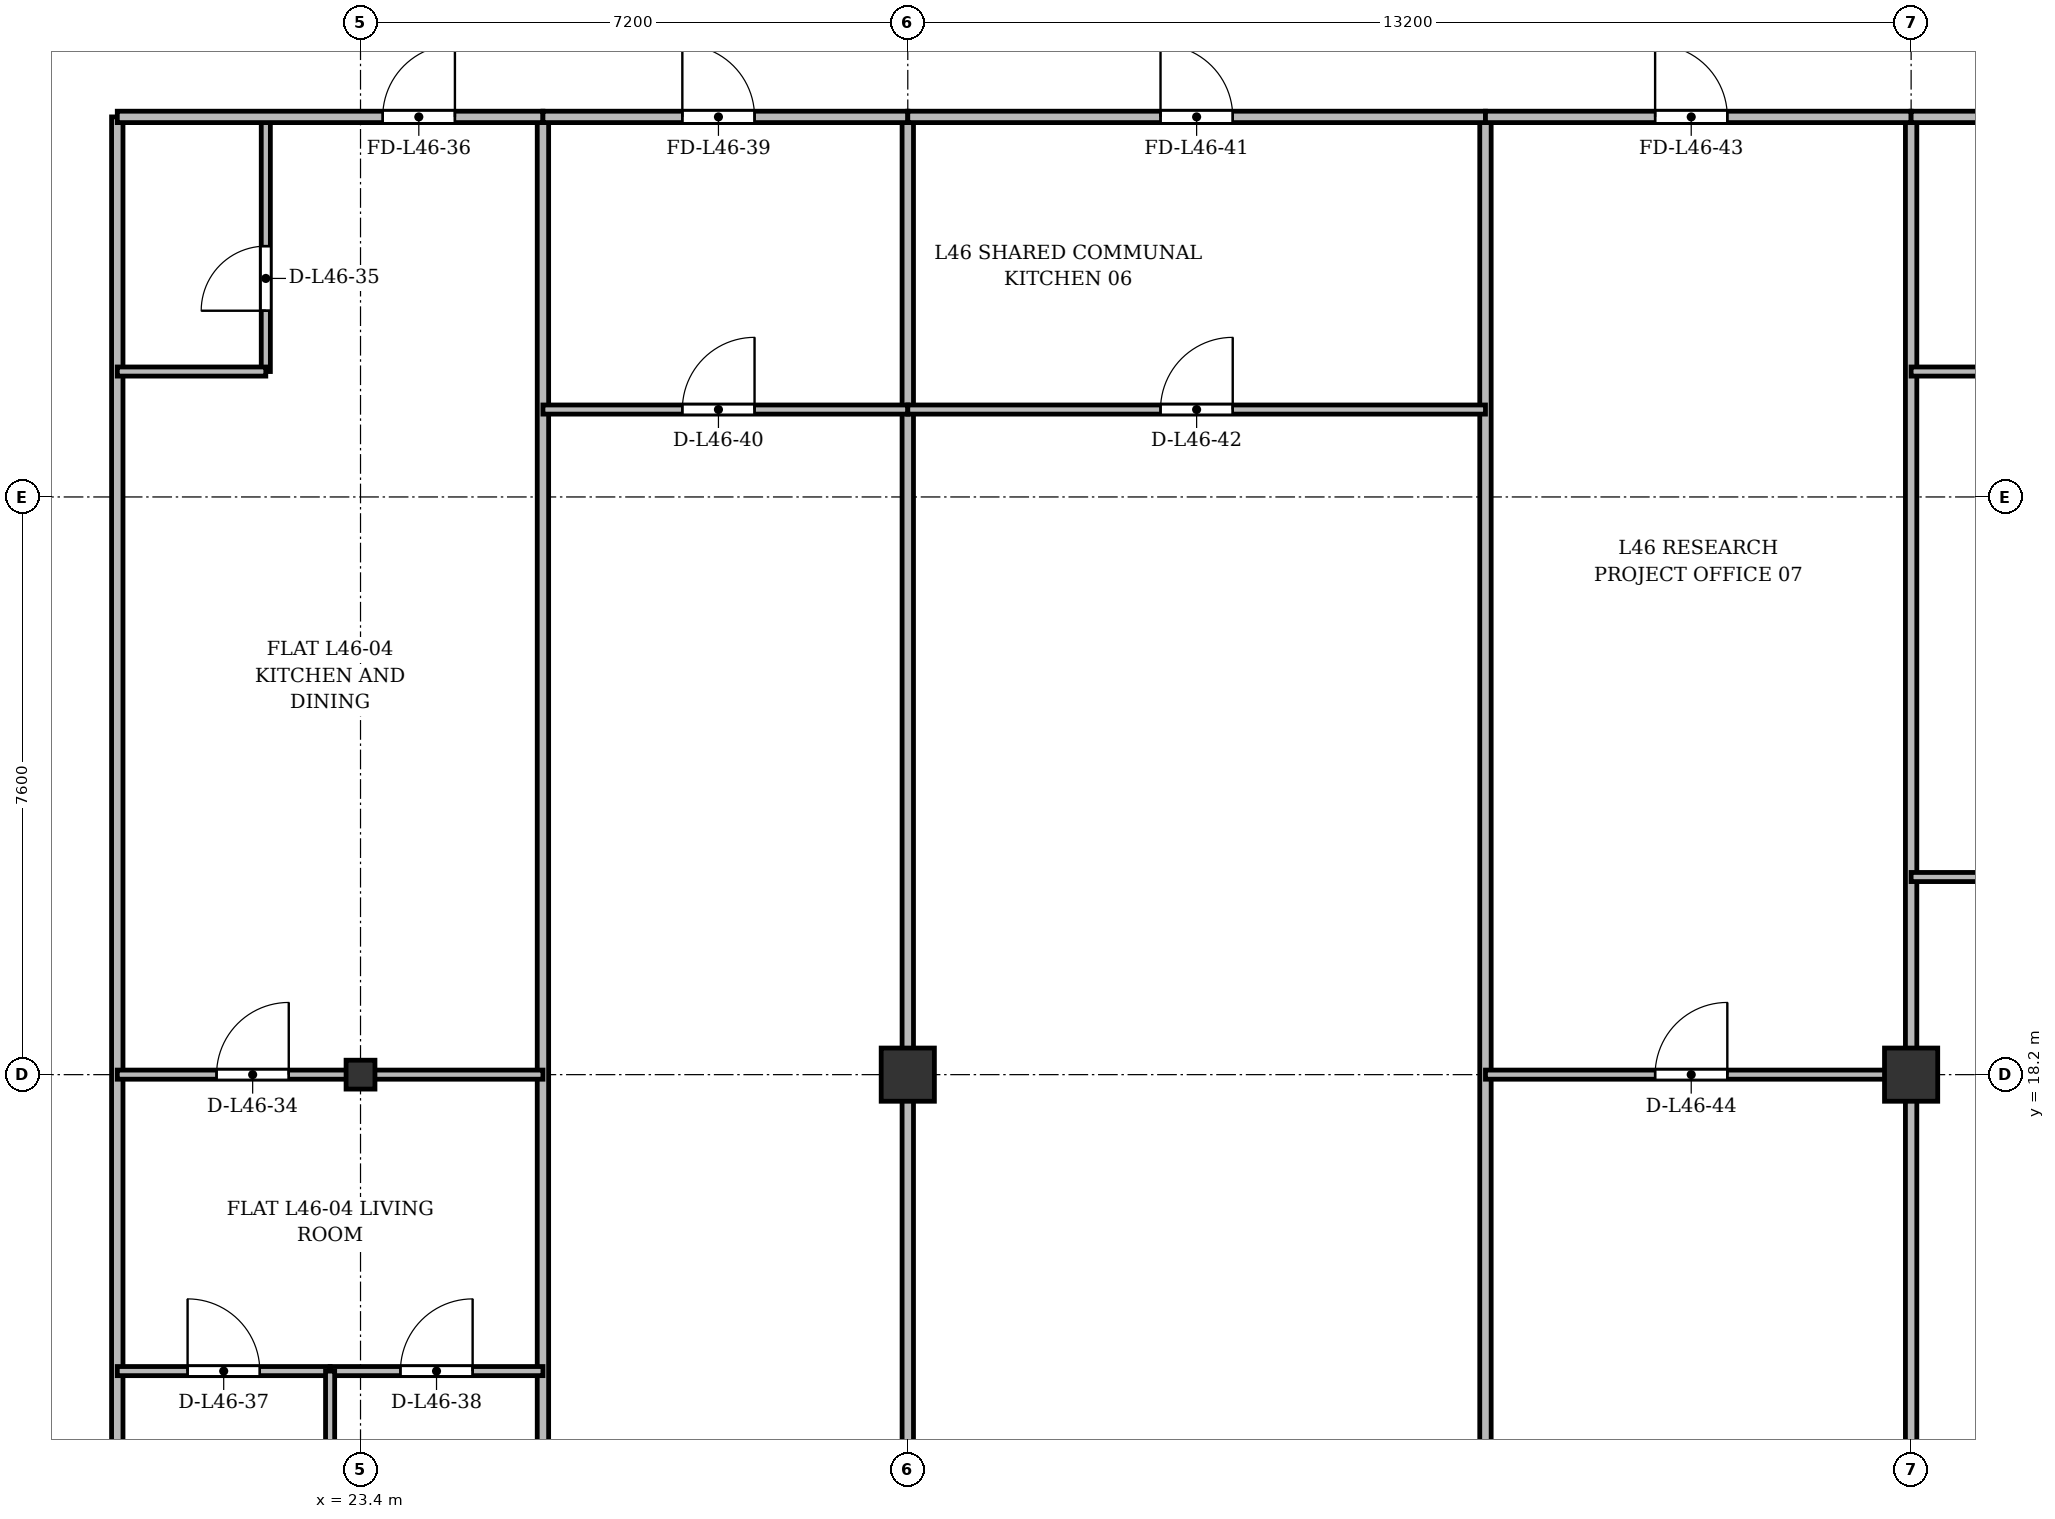
"""IFC4 building model, lengths in metres.
Left out: names, types, materials, properties, quantities, classifications, styles, units other than length and angle.
Written with IfcOpenShell. Run it as: python <this file> out.ifc"""

import sys

from ifc_helpers import new_model, si_unit, direction, frame, frame_2d, origin, origin_2d, place, context, subcontext, project, spatial, rectangle, i_section, extrude, source, transform, mapped, element, fill, save


model = new_model("IFC4")
c1 = context("Model", 3, precision=1e-05, world=origin(), true_north=direction((0.0, 1.0)))
c2 = subcontext(c1, "Body", "Model", "MODEL_VIEW")
j1 = project(units=[si_unit("LENGTHUNIT", "METRE"), si_unit("PLANEANGLEUNIT", "RADIAN")], contexts=[c1])
p1 = place(None, origin())
s1 = spatial("IfcSite", under=j1, at=p1, CompositionType="ELEMENT")
p2 = place(p1, origin())
s2 = spatial("IfcBuilding", under=s1, at=p2, CompositionType="ELEMENT")
p3 = place(p2, frame((0.0, 0.0, 175.3)))
s3 = spatial("IfcBuildingStorey", under=s2, at=p3, CompositionType="ELEMENT", Elevation=175.3)
m1 = source(origin(), c2, "Body", "SweptSolid", [
    extrude(i_section(OverallWidth=0.38, OverallDepth=0.38, WebThickness=0.02, FlangeThickness=0.03, at=origin_2d()), origin(), (0.0, 0.0, 1.0), 3.6),
])
p4 = place(p3, frame((23.4, 18.2, 0.0), z_axis=(0.0, 0.0, 1.0), x_axis=(1.0, 0.0, 0.0)))
e1 = element("IfcColumn", 1, at=p4, inside=s3, PredefinedType="COLUMN", context=c2, shape_type="MappedRepresentation", body=[
    mapped(m1, transform((0.0, 0.0, 0.0), x_axis=(1.0, 0.0, 0.0), y_axis=(0.0, 1.0, 0.0), z_axis=(0.0, 0.0, 1.0), scale=1.0)),
])
m2 = source(origin(), c2, "Body", "SweptSolid", [
    extrude(rectangle(XDim=0.7, YDim=0.7, at=origin_2d()), origin(), (0.0, 0.0, 1.0), 3.6),
])
for number, where, z_axis, x_axis in (
    (2, (30.6, 18.2, 0.0), (0.0, 0.0, 1.0), (1.0, 0.0, 0.0)),
    (3, (43.8, 18.2, 0.0), (0.0, 0.0, 1.0), (1.0, 0.0, 0.0)),
):
    element("IfcColumn", number, at=place(p3, frame(where, z_axis=z_axis, x_axis=x_axis)), inside=s3, PredefinedType="COLUMN", context=c2, shape_type="MappedRepresentation", body=[
        mapped(m2, transform((0.0, 0.0, 0.0), x_axis=(1.0, 0.0, 0.0), y_axis=(0.0, 1.0, 0.0), z_axis=(0.0, 0.0, 1.0), scale=1.0)),
    ])
p5 = place(p3, frame((25.8, 6.81, 0.0), z_axis=(0.0, 0.0, 1.0), x_axis=(0.0, 1.0, 0.0)))
e4 = element("IfcWall", 4, at=p5, inside=s3, PredefinedType="PARTITIONING", context=c2, shape_type="SweptSolid", body=[
    extrude(rectangle(XDim=23.99, YDim=0.15, at=frame_2d((11.995, 0.0))), origin(), (0.0, 0.0, 1.0), 2.75),
])
p6 = place(p3, frame((30.6, 3.525, 0.0), z_axis=(0.0, 0.0, 1.0), x_axis=(0.0, 1.0, 0.0)))
e5 = element("IfcWall", 5, at=p6, inside=s3, PredefinedType="PARTITIONING", context=c2, shape_type="SweptSolid", body=[
    extrude(rectangle(XDim=27.275, YDim=0.15, at=frame_2d((13.638, 0.0))), origin(), (0.0, 0.0, 1.0), 2.85),
])
p7 = place(p3, frame((38.2, 3.525, 0.0), z_axis=(0.0, 0.0, 1.0), x_axis=(0.0, 1.0, 0.0)))
e6 = element("IfcWall", 6, at=p7, inside=s3, PredefinedType="PARTITIONING", context=c2, shape_type="SweptSolid", body=[
    extrude(rectangle(XDim=27.275, YDim=0.15, at=frame_2d((13.638, 0.0))), origin(), (0.0, 0.0, 1.0), 2.75),
])
p8 = place(p3, frame((43.8, 3.525, 0.0), z_axis=(0.0, 0.0, 1.0), x_axis=(0.0, 1.0, 0.0)))
e7 = element("IfcWall", 7, at=p8, inside=s3, PredefinedType="PARTITIONING", context=c2, shape_type="SweptSolid", body=[
    extrude(rectangle(XDim=27.275, YDim=0.15, at=frame_2d((13.638, 0.0))), origin(), (0.0, 0.0, 1.0), 2.85),
])
p9 = place(p3, frame((20.2, 6.81, 0.0), z_axis=(0.0, 0.0, 1.0), x_axis=(0.0, 1.0, 0.0)))
e8 = element("IfcWall", 8, at=p9, inside=s3, PredefinedType="PARTITIONING", context=c2, shape_type="SweptSolid", body=[
    extrude(rectangle(XDim=23.99, YDim=0.15, at=frame_2d((11.995, 0.0))), origin(), (0.0, 0.0, 1.0), 2.75),
])
p10 = place(p3, frame((20.2, 18.2, 0.0), z_axis=(0.0, 0.0, 1.0), x_axis=(1.0, 0.0, 0.0)))
e9 = element("IfcWall", 9, at=p10, inside=s3, PredefinedType="PARTITIONING", context=c2, shape_type="SweptSolid", body=[
    extrude(rectangle(XDim=5.6, YDim=0.12, at=frame_2d((2.8, 0.0))), origin(), (0.0, 0.0, 1.0), 2.75),
])
p11 = place(p10, frame((1.306, 0.0, 0.0)))
e10 = element("IfcOpeningElement", 10, at=p11, cuts=e9, PredefinedType="OPENING", context=c2, shape_type="SweptSolid", body=[
    extrude(rectangle(XDim=0.95, YDim=2.15, at=frame_2d((0.475, 1.075))), frame((0.0, 0.07, 0.0), z_axis=(0.0, -1.0, 0.0), x_axis=(1.0, 0.0, 0.0)), (0.0, 0.0, 1.0), 0.14),
])
p12 = place(p3, frame((22.154, 27.45, 0.0), z_axis=(0.0, 0.0, 1.0), x_axis=(0.0, 1.0, 0.0)))
e11 = element("IfcWall", 11, at=p12, inside=s3, PredefinedType="PARTITIONING", context=c2, shape_type="SweptSolid", body=[
    extrude(rectangle(XDim=3.35, YDim=0.12, at=frame_2d((1.675, 0.0))), origin(), (0.0, 0.0, 1.0), 3.35),
])
p13 = place(p12, frame((0.8, 0.0, 0.0)))
e12 = element("IfcOpeningElement", 12, at=p13, cuts=e11, PredefinedType="OPENING", context=c2, shape_type="SweptSolid", body=[
    extrude(rectangle(XDim=0.85, YDim=2.1, at=frame_2d((0.425, 1.05))), frame((0.0, 0.07, 0.0), z_axis=(0.0, -1.0, 0.0), x_axis=(1.0, 0.0, 0.0)), (0.0, 0.0, 1.0), 0.14),
])
p14 = place(p3, frame((20.2, 27.45, 0.0), z_axis=(0.0, 0.0, 1.0), x_axis=(1.0, 0.0, 0.0)))
e13 = element("IfcWall", 13, at=p14, inside=s3, PredefinedType="PARTITIONING", context=c2, shape_type="SweptSolid", body=[
    extrude(rectangle(XDim=1.954, YDim=0.12, at=frame_2d((0.977, 0.0))), origin(), (0.0, 0.0, 1.0), 3.35),
])
p15 = place(p3, frame((20.2, 30.8, 0.0), z_axis=(0.0, 0.0, 1.0), x_axis=(1.0, 0.0, 0.0)))
e14 = element("IfcWall", 14, at=p15, inside=s3, PredefinedType="PARTITIONING", context=c2, shape_type="SweptSolid", body=[
    extrude(rectangle(XDim=5.6, YDim=0.15, at=frame_2d((2.8, 0.0))), origin(), (0.0, 0.0, 1.0), 2.85),
])
p16 = place(p15, frame((3.492, 0.0, 0.0)))
e15 = element("IfcOpeningElement", 15, at=p16, cuts=e14, PredefinedType="OPENING", context=c2, shape_type="SweptSolid", body=[
    extrude(rectangle(XDim=0.95, YDim=2.15, at=frame_2d((0.475, 1.075))), frame((0.0, 0.085, 0.0), z_axis=(0.0, -1.0, 0.0), x_axis=(1.0, 0.0, 0.0)), (0.0, 0.0, 1.0), 0.17),
])
p17 = place(p3, frame((20.2, 14.3, 0.0), z_axis=(0.0, 0.0, 1.0), x_axis=(1.0, 0.0, 0.0)))
e16 = element("IfcWall", 16, at=p17, inside=s3, PredefinedType="PARTITIONING", context=c2, shape_type="SweptSolid", body=[
    extrude(rectangle(XDim=2.8, YDim=0.12, at=frame_2d((1.4, 0.0))), origin(), (0.0, 0.0, 1.0), 3.35),
])
p18 = place(p17, frame((0.925, 0.0, 0.0)))
e17 = element("IfcOpeningElement", 17, at=p18, cuts=e16, PredefinedType="OPENING", context=c2, shape_type="SweptSolid", body=[
    extrude(rectangle(XDim=0.95, YDim=2.15, at=frame_2d((0.475, 1.075))), frame((0.0, 0.07, 0.0), z_axis=(0.0, -1.0, 0.0), x_axis=(1.0, 0.0, 0.0)), (0.0, 0.0, 1.0), 0.14),
])
p19 = place(p3, frame((23.0, 14.3, 0.0), z_axis=(0.0, 0.0, 1.0), x_axis=(1.0, 0.0, 0.0)))
e18 = element("IfcWall", 18, at=p19, inside=s3, PredefinedType="PARTITIONING", context=c2, shape_type="SweptSolid", body=[
    extrude(rectangle(XDim=2.8, YDim=0.12, at=frame_2d((1.4, 0.0))), origin(), (0.0, 0.0, 1.0), 2.85),
])
p20 = place(p19, frame((0.925, 0.0, 0.0)))
e19 = element("IfcOpeningElement", 19, at=p20, cuts=e18, PredefinedType="OPENING", context=c2, shape_type="SweptSolid", body=[
    extrude(rectangle(XDim=0.95, YDim=2.15, at=frame_2d((0.475, 1.075))), frame((0.0, 0.07, 0.0), z_axis=(0.0, -1.0, 0.0), x_axis=(1.0, 0.0, 0.0)), (0.0, 0.0, 1.0), 0.14),
])
p21 = place(p3, frame((23.0, 6.81, 0.0), z_axis=(0.0, 0.0, 1.0), x_axis=(0.0, 1.0, 0.0)))
e20 = element("IfcWall", 20, at=p21, inside=s3, PredefinedType="PARTITIONING", context=c2, shape_type="SweptSolid", body=[
    extrude(rectangle(XDim=7.49, YDim=0.12, at=frame_2d((3.745, 0.0))), origin(), (0.0, 0.0, 1.0), 3.35),
])
p22 = place(p3, frame((25.8, 30.8, 0.0), z_axis=(0.0, 0.0, 1.0), x_axis=(1.0, 0.0, 0.0)))
e21 = element("IfcWall", 21, at=p22, inside=s3, PredefinedType="PARTITIONING", context=c2, shape_type="SweptSolid", body=[
    extrude(rectangle(XDim=4.8, YDim=0.15, at=frame_2d((2.4, 0.0))), origin(), (0.0, 0.0, 1.0), 2.85),
])
p23 = place(p22, frame((1.834, 0.0, 0.0)))
e22 = element("IfcOpeningElement", 22, at=p23, cuts=e21, PredefinedType="OPENING", context=c2, shape_type="SweptSolid", body=[
    extrude(rectangle(XDim=0.95, YDim=2.15, at=frame_2d((0.475, 1.075))), frame((0.0, 0.085, 0.0), z_axis=(0.0, -1.0, 0.0), x_axis=(1.0, 0.0, 0.0)), (0.0, 0.0, 1.0), 0.17),
])
p24 = place(p3, frame((25.8, 26.95, 0.0), z_axis=(0.0, 0.0, 1.0), x_axis=(1.0, 0.0, 0.0)))
e23 = element("IfcWall", 23, at=p24, inside=s3, PredefinedType="PARTITIONING", context=c2, shape_type="SweptSolid", body=[
    extrude(rectangle(XDim=4.8, YDim=0.12, at=frame_2d((2.4, 0.0))), origin(), (0.0, 0.0, 1.0), 2.85),
])
p25 = place(p24, frame((1.834, 0.0, 0.0)))
e24 = element("IfcOpeningElement", 24, at=p25, cuts=e23, PredefinedType="OPENING", context=c2, shape_type="SweptSolid", body=[
    extrude(rectangle(XDim=0.95, YDim=2.15, at=frame_2d((0.475, 1.075))), frame((0.0, 0.07, 0.0), z_axis=(0.0, -1.0, 0.0), x_axis=(1.0, 0.0, 0.0)), (0.0, 0.0, 1.0), 0.14),
])
p26 = place(p3, frame((30.6, 30.8, 0.0), z_axis=(0.0, 0.0, 1.0), x_axis=(1.0, 0.0, 0.0)))
e25 = element("IfcWall", 25, at=p26, inside=s3, PredefinedType="PARTITIONING", context=c2, shape_type="SweptSolid", body=[
    extrude(rectangle(XDim=7.6, YDim=0.15, at=frame_2d((3.8, 0.0))), origin(), (0.0, 0.0, 1.0), 2.85),
])
p27 = place(p26, frame((3.325, 0.0, 0.0)))
e26 = element("IfcOpeningElement", 26, at=p27, cuts=e25, PredefinedType="OPENING", context=c2, shape_type="SweptSolid", body=[
    extrude(rectangle(XDim=0.95, YDim=2.15, at=frame_2d((0.475, 1.075))), frame((0.0, 0.085, 0.0), z_axis=(0.0, -1.0, 0.0), x_axis=(1.0, 0.0, 0.0)), (0.0, 0.0, 1.0), 0.17),
])
p28 = place(p3, frame((30.6, 26.95, 0.0), z_axis=(0.0, 0.0, 1.0), x_axis=(1.0, 0.0, 0.0)))
e27 = element("IfcWall", 27, at=p28, inside=s3, PredefinedType="PARTITIONING", context=c2, shape_type="SweptSolid", body=[
    extrude(rectangle(XDim=7.6, YDim=0.12, at=frame_2d((3.8, 0.0))), origin(), (0.0, 0.0, 1.0), 2.85),
])
p29 = place(p28, frame((3.325, 0.0, 0.0)))
e28 = element("IfcOpeningElement", 28, at=p29, cuts=e27, PredefinedType="OPENING", context=c2, shape_type="SweptSolid", body=[
    extrude(rectangle(XDim=0.95, YDim=2.15, at=frame_2d((0.475, 1.075))), frame((0.0, 0.07, 0.0), z_axis=(0.0, -1.0, 0.0), x_axis=(1.0, 0.0, 0.0)), (0.0, 0.0, 1.0), 0.14),
])
p30 = place(p3, frame((38.2, 30.8, 0.0), z_axis=(0.0, 0.0, 1.0), x_axis=(1.0, 0.0, 0.0)))
e29 = element("IfcWall", 29, at=p30, inside=s3, PredefinedType="PARTITIONING", context=c2, shape_type="SweptSolid", body=[
    extrude(rectangle(XDim=5.6, YDim=0.15, at=frame_2d((2.8, 0.0))), origin(), (0.0, 0.0, 1.0), 2.85),
])
p31 = place(p30, frame((2.232, 0.0, 0.0)))
e30 = element("IfcOpeningElement", 30, at=p31, cuts=e29, PredefinedType="OPENING", context=c2, shape_type="SweptSolid", body=[
    extrude(rectangle(XDim=0.95, YDim=2.15, at=frame_2d((0.475, 1.075))), frame((0.0, 0.085, 0.0), z_axis=(0.0, -1.0, 0.0), x_axis=(1.0, 0.0, 0.0)), (0.0, 0.0, 1.0), 0.17),
])
p32 = place(p3, frame((38.2, 18.2, 0.0), z_axis=(0.0, 0.0, 1.0), x_axis=(1.0, 0.0, 0.0)))
e31 = element("IfcWall", 31, at=p32, inside=s3, PredefinedType="PARTITIONING", context=c2, shape_type="SweptSolid", body=[
    extrude(rectangle(XDim=5.6, YDim=0.12, at=frame_2d((2.8, 0.0))), origin(), (0.0, 0.0, 1.0), 2.75),
])
p33 = place(p32, frame((2.232, 0.0, 0.0)))
e32 = element("IfcOpeningElement", 32, at=p33, cuts=e31, PredefinedType="OPENING", context=c2, shape_type="SweptSolid", body=[
    extrude(rectangle(XDim=0.95, YDim=2.15, at=frame_2d((0.475, 1.075))), frame((0.0, 0.07, 0.0), z_axis=(0.0, -1.0, 0.0), x_axis=(1.0, 0.0, 0.0)), (0.0, 0.0, 1.0), 0.14),
])
p34 = place(p3, frame((43.8, 20.8, 0.0), z_axis=(0.0, 0.0, 1.0), x_axis=(1.0, 0.0, 0.0)))
e33 = element("IfcWall", 33, at=p34, inside=s3, PredefinedType="PARTITIONING", context=c2, shape_type="SweptSolid", body=[
    extrude(rectangle(XDim=7.2, YDim=0.12, at=frame_2d((3.6, 0.0))), origin(), (0.0, 0.0, 1.0), 2.85),
])
p35 = place(p34, frame((3.125, 0.0, 0.0)))
e34 = element("IfcOpeningElement", 34, at=p35, cuts=e33, PredefinedType="OPENING", context=c2, shape_type="SweptSolid", body=[
    extrude(rectangle(XDim=0.95, YDim=2.15, at=frame_2d((0.475, 1.075))), frame((0.0, 0.07, 0.0), z_axis=(0.0, -1.0, 0.0), x_axis=(1.0, 0.0, 0.0)), (0.0, 0.0, 1.0), 0.14),
])
p36 = place(p3, frame((43.8, 27.45, 0.0), z_axis=(0.0, 0.0, 1.0), x_axis=(1.0, 0.0, 0.0)))
e35 = element("IfcWall", 35, at=p36, inside=s3, PredefinedType="PARTITIONING", context=c2, shape_type="SweptSolid", body=[
    extrude(rectangle(XDim=2.4, YDim=0.12, at=frame_2d((1.2, 0.0))), origin(), (0.0, 0.0, 1.0), 2.85),
])
p37 = place(p3, frame((43.8, 30.8, 0.0), z_axis=(0.0, 0.0, 1.0), x_axis=(1.0, 0.0, 0.0)))
e36 = element("IfcWall", 36, at=p37, inside=s3, PredefinedType="PARTITIONING", context=c2, shape_type="SweptSolid", body=[
    extrude(rectangle(XDim=7.2, YDim=0.15, at=frame_2d((3.6, 0.0))), origin(), (0.0, 0.0, 1.0), 2.85),
])
p38 = place(p37, frame((4.706, 0.0, 0.0)))
e37 = element("IfcOpeningElement", 37, at=p38, cuts=e36, PredefinedType="OPENING", context=c2, shape_type="SweptSolid", body=[
    extrude(rectangle(XDim=0.95, YDim=2.15, at=frame_2d((0.475, 1.075))), frame((0.0, 0.085, 0.0), z_axis=(0.0, -1.0, 0.0), x_axis=(1.0, 0.0, 0.0)), (0.0, 0.0, 1.0), 0.17),
])
m3 = source(origin(), c2, "Body", "SweptSolid", [
    extrude(rectangle(XDim=0.95, YDim=2.15, at=frame_2d((0.475, 1.075))), frame((0.0, 0.025, 0.0), z_axis=(0.0, -1.0, 0.0), x_axis=(1.0, 0.0, 0.0)), (0.0, 0.0, 1.0), 0.05),
])
p39 = place(p11, origin())
e38 = element("IfcDoor", 38, at=p39, inside=s3, OperationType="SINGLE_SWING_RIGHT", PredefinedType="DOOR", context=c2, shape_type="MappedRepresentation", body=[
    mapped(m3, transform((0.0, 0.0, 0.0), x_axis=(1.0, 0.0, 0.0), y_axis=(0.0, 1.0, 0.0), z_axis=(0.0, 0.0, 1.0), scale=1.0)),
])
fill(e10, e38)
m4 = source(origin(), c2, "Body", "SweptSolid", [
    extrude(rectangle(XDim=0.85, YDim=2.1, at=frame_2d((0.425, 1.05))), frame((0.0, 0.025, 0.0), z_axis=(0.0, -1.0, 0.0), x_axis=(1.0, 0.0, 0.0)), (0.0, 0.0, 1.0), 0.05),
])
p40 = place(p13, origin())
e39 = element("IfcDoor", 39, at=p40, inside=s3, OperationType="SINGLE_SWING_LEFT", PredefinedType="DOOR", context=c2, shape_type="MappedRepresentation", body=[
    mapped(m4, transform((0.0, 0.0, 0.0), x_axis=(1.0, 0.0, 0.0), y_axis=(0.0, 1.0, 0.0), z_axis=(0.0, 0.0, 1.0), scale=1.0)),
])
fill(e12, e39)
p41 = place(p16, origin())
e40 = element("IfcDoor", 40, at=p41, inside=s3, OperationType="SINGLE_SWING_RIGHT", PredefinedType="DOOR", context=c2, shape_type="MappedRepresentation", body=[
    mapped(m3, transform((0.0, 0.0, 0.0), x_axis=(1.0, 0.0, 0.0), y_axis=(0.0, 1.0, 0.0), z_axis=(0.0, 0.0, 1.0), scale=1.0)),
])
fill(e15, e40)
p42 = place(p18, origin())
e41 = element("IfcDoor", 41, at=p42, inside=s3, OperationType="SINGLE_SWING_LEFT", PredefinedType="DOOR", context=c2, shape_type="MappedRepresentation", body=[
    mapped(m3, transform((0.0, 0.0, 0.0), x_axis=(1.0, 0.0, 0.0), y_axis=(0.0, 1.0, 0.0), z_axis=(0.0, 0.0, 1.0), scale=1.0)),
])
fill(e17, e41)
p43 = place(p20, origin())
e42 = element("IfcDoor", 42, at=p43, inside=s3, OperationType="SINGLE_SWING_RIGHT", PredefinedType="DOOR", context=c2, shape_type="MappedRepresentation", body=[
    mapped(m3, transform((0.0, 0.0, 0.0), x_axis=(1.0, 0.0, 0.0), y_axis=(0.0, 1.0, 0.0), z_axis=(0.0, 0.0, 1.0), scale=1.0)),
])
fill(e19, e42)
p44 = place(p23, origin())
e43 = element("IfcDoor", 43, at=p44, inside=s3, OperationType="SINGLE_SWING_LEFT", PredefinedType="DOOR", context=c2, shape_type="MappedRepresentation", body=[
    mapped(m3, transform((0.0, 0.0, 0.0), x_axis=(1.0, 0.0, 0.0), y_axis=(0.0, 1.0, 0.0), z_axis=(0.0, 0.0, 1.0), scale=1.0)),
])
fill(e22, e43)
p45 = place(p25, origin())
e44 = element("IfcDoor", 44, at=p45, inside=s3, OperationType="SINGLE_SWING_RIGHT", PredefinedType="DOOR", context=c2, shape_type="MappedRepresentation", body=[
    mapped(m3, transform((0.0, 0.0, 0.0), x_axis=(1.0, 0.0, 0.0), y_axis=(0.0, 1.0, 0.0), z_axis=(0.0, 0.0, 1.0), scale=1.0)),
])
fill(e24, e44)
p46 = place(p27, origin())
e45 = element("IfcDoor", 45, at=p46, inside=s3, OperationType="SINGLE_SWING_LEFT", PredefinedType="DOOR", context=c2, shape_type="MappedRepresentation", body=[
    mapped(m3, transform((0.0, 0.0, 0.0), x_axis=(1.0, 0.0, 0.0), y_axis=(0.0, 1.0, 0.0), z_axis=(0.0, 0.0, 1.0), scale=1.0)),
])
fill(e26, e45)
p47 = place(p29, origin())
e46 = element("IfcDoor", 46, at=p47, inside=s3, OperationType="SINGLE_SWING_RIGHT", PredefinedType="DOOR", context=c2, shape_type="MappedRepresentation", body=[
    mapped(m3, transform((0.0, 0.0, 0.0), x_axis=(1.0, 0.0, 0.0), y_axis=(0.0, 1.0, 0.0), z_axis=(0.0, 0.0, 1.0), scale=1.0)),
])
fill(e28, e46)
p48 = place(p31, origin())
e47 = element("IfcDoor", 47, at=p48, inside=s3, OperationType="SINGLE_SWING_LEFT", PredefinedType="DOOR", context=c2, shape_type="MappedRepresentation", body=[
    mapped(m3, transform((0.0, 0.0, 0.0), x_axis=(1.0, 0.0, 0.0), y_axis=(0.0, 1.0, 0.0), z_axis=(0.0, 0.0, 1.0), scale=1.0)),
])
fill(e30, e47)
p49 = place(p33, origin())
e48 = element("IfcDoor", 48, at=p49, inside=s3, OperationType="SINGLE_SWING_RIGHT", PredefinedType="DOOR", context=c2, shape_type="MappedRepresentation", body=[
    mapped(m3, transform((0.0, 0.0, 0.0), x_axis=(1.0, 0.0, 0.0), y_axis=(0.0, 1.0, 0.0), z_axis=(0.0, 0.0, 1.0), scale=1.0)),
])
fill(e32, e48)
save(model, sys.argv[1])
